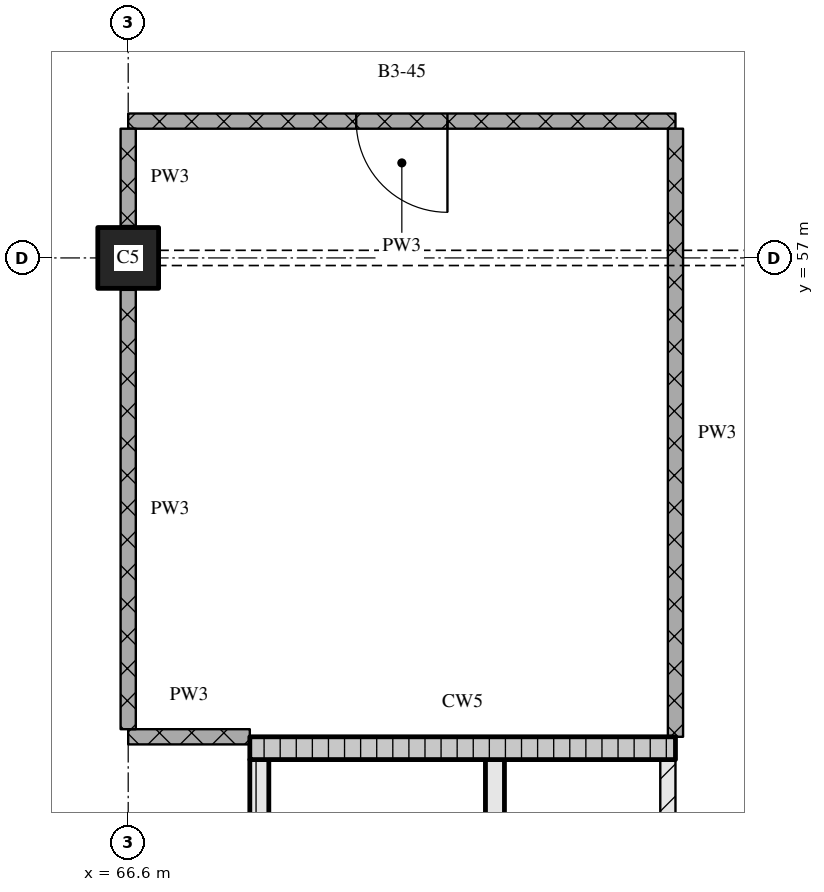
"""IFC4 building model, lengths in metres.
Left out: names, types, materials, properties, quantities, classifications, styles, units other than length and angle.
Written with IfcOpenShell. Run it as: python <this file> out.ifc"""

import sys

from ifc_helpers import new_model, si_unit, direction, frame, frame_2d, origin, origin_2d, place, context, subcontext, project, spatial, rectangle, extrude, element, fill, save


model = new_model("IFC4")
c1 = context("Model", 3, precision=1e-05, world=origin(), true_north=direction((0.0, 1.0)))
c2 = subcontext(c1, "Body", "Model", "MODEL_VIEW")
j1 = project(units=[si_unit("LENGTHUNIT", "METRE"), si_unit("PLANEANGLEUNIT", "RADIAN")], contexts=[c1])
p1 = place(None, origin())
s1 = spatial("IfcSite", under=j1, at=p1, CompositionType="ELEMENT")
p2 = place(p1, origin())
s2 = spatial("IfcBuilding", under=s1, at=p2, CompositionType="ELEMENT")
p3 = place(p2, frame((0.0, 0.0, 124.05)))
s3 = spatial("IfcBuildingStorey", under=s2, at=p3, CompositionType="ELEMENT", Elevation=124.05)
p4 = place(p3, frame((66.6, 57.0, 0.0), z_axis=(0.0, 0.0, 1.0), x_axis=(1.0, 0.0, 0.0)))
e1 = element("IfcColumn", 1, at=p4, inside=s3, PredefinedType="COLUMN", context=c2, shape_type="SweptSolid", body=[
    extrude(rectangle(XDim=0.8, YDim=0.8, at=origin_2d()), origin(), (0.0, 0.0, 1.0), 3.6),
])
p5 = place(p3, frame((68.325, 43.5, 0.0), z_axis=(0.0, 0.0, 1.0), x_axis=(0.0, 1.0, 0.0)))
e2 = element("IfcWall", 2, at=p5, inside=s3, PredefinedType="SOLIDWALL", context=c2, shape_type="SweptSolid", body=[
    extrude(rectangle(XDim=6.9, YDim=0.25, at=frame_2d((3.45, 0.0))), origin(), (0.0, 0.0, 1.0), 3.32),
])
p6 = place(p3, frame((71.425, 43.5, 0.0), z_axis=(0.0, 0.0, 1.0), x_axis=(0.0, 1.0, 0.0)))
e3 = element("IfcWall", 3, at=p6, inside=s3, PredefinedType="SOLIDWALL", context=c2, shape_type="SweptSolid", body=[
    extrude(rectangle(XDim=6.9, YDim=0.25, at=frame_2d((3.45, 0.0))), origin(), (0.0, 0.0, 1.0), 3.32),
])
p7 = place(p6, frame((0.2, 0.0, 0.0)))
e4 = element("IfcOpeningElement", 4, at=p7, cuts=e3, PredefinedType="OPENING", context=c2, shape_type="SweptSolid", body=[
    extrude(rectangle(XDim=1.0, YDim=2.1, at=frame_2d((0.5, 1.05))), frame((0.0, 0.135, 0.0), z_axis=(0.0, -1.0, 0.0), x_axis=(1.0, 0.0, 0.0)), (0.0, 0.0, 1.0), 0.27),
])
p8 = place(p3, frame((73.7, 43.5, 0.0), z_axis=(0.0, 0.0, 1.0), x_axis=(0.0, 1.0, 0.0)))
e5 = element("IfcWall", 5, at=p8, inside=s3, PredefinedType="PARTITIONING", context=c2, shape_type="SweptSolid", body=[
    extrude(rectangle(XDim=6.9, YDim=0.2, at=frame_2d((3.45, 0.0))), origin(), (0.0, 0.0, 1.0), 3.32),
])
p9 = place(p8, frame((1.0, 0.0, 0.0)))
e6 = element("IfcOpeningElement", 6, at=p9, cuts=e5, PredefinedType="OPENING", context=c2, shape_type="SweptSolid", body=[
    extrude(rectangle(XDim=1.0, YDim=2.1, at=frame_2d((0.5, 1.05))), frame((0.0, 0.11, 0.0), z_axis=(0.0, -1.0, 0.0), x_axis=(1.0, 0.0, 0.0)), (0.0, 0.0, 1.0), 0.22),
])
p10 = place(p3, frame((68.2, 50.55, 0.0), z_axis=(0.0, 0.0, 1.0), x_axis=(1.0, 0.0, 0.0)))
e7 = element("IfcWall", 7, at=p10, inside=s3, PredefinedType="SOLIDWALL", context=c2, shape_type="SweptSolid", body=[
    extrude(rectangle(XDim=5.6, YDim=0.3, at=frame_2d((2.8, 0.0))), origin(), (0.0, 0.0, 1.0), 3.32),
])
p11 = place(p3, frame((66.6, 50.7, 0.0), z_axis=(0.0, 0.0, 1.0), x_axis=(1.0, 0.0, 0.0)))
e8 = element("IfcWall", 8, at=p11, inside=s3, PredefinedType="PARTITIONING", context=c2, shape_type="SweptSolid", body=[
    extrude(rectangle(XDim=1.6, YDim=0.2, at=frame_2d((0.8, 0.0))), origin(), (0.0, 0.0, 1.0), 3.32),
])
p12 = place(p3, frame((73.8, 58.8, 0.0), z_axis=(0.0, 0.0, 1.0), x_axis=(-1.0, 0.0, 0.0)))
e9 = element("IfcWall", 9, at=p12, inside=s3, PredefinedType="PARTITIONING", context=c2, shape_type="SweptSolid", body=[
    extrude(rectangle(XDim=7.2, YDim=0.2, at=frame_2d((3.6, 0.0))), origin(), (0.0, 0.0, 1.0), 3.32),
])
p13 = place(p12, frame((3.0, 0.0, 0.0)))
e10 = element("IfcOpeningElement", 10, at=p13, cuts=e9, PredefinedType="OPENING", context=c2, shape_type="SweptSolid", body=[
    extrude(rectangle(XDim=1.2, YDim=2.1, at=frame_2d((0.6, 1.05))), frame((0.0, 0.11, 0.0), z_axis=(0.0, -1.0, 0.0), x_axis=(1.0, 0.0, 0.0)), (0.0, 0.0, 1.0), 0.22),
])
p14 = place(p3, frame((66.6, 56.58, 0.0), z_axis=(0.0, 0.0, 1.0), x_axis=(0.0, -1.0, 0.0)))
e11 = element("IfcWall", 11, at=p14, inside=s3, PredefinedType="PARTITIONING", context=c2, shape_type="SweptSolid", body=[
    extrude(rectangle(XDim=5.78, YDim=0.2, at=frame_2d((2.89, 0.0))), origin(), (0.0, 0.0, 1.0), 3.32),
])
p15 = place(p3, frame((66.6, 58.7, 0.0), z_axis=(0.0, 0.0, 1.0), x_axis=(0.0, -1.0, 0.0)))
e12 = element("IfcWall", 12, at=p15, inside=s3, PredefinedType="PARTITIONING", context=c2, shape_type="SweptSolid", body=[
    extrude(rectangle(XDim=1.28, YDim=0.2, at=frame_2d((0.64, 0.0))), origin(), (0.0, 0.0, 1.0), 3.32),
])
p16 = place(p3, frame((73.8, 58.7, 0.0), z_axis=(0.0, 0.0, 1.0), x_axis=(0.0, -1.0, 0.0)))
e13 = element("IfcWall", 13, at=p16, inside=s3, PredefinedType="PARTITIONING", context=c2, shape_type="SweptSolid", body=[
    extrude(rectangle(XDim=8.0, YDim=0.2, at=frame_2d((4.0, 0.0))), origin(), (0.0, 0.0, 1.0), 3.32),
])
p17 = place(p13, origin())
e14 = element("IfcDoor", 14, at=p17, inside=s3, OperationType="SINGLE_SWING_LEFT", PredefinedType="DOOR", context=c2, shape_type="SweptSolid", body=[
    extrude(rectangle(XDim=1.2, YDim=2.1, at=frame_2d((0.6, 1.05))), frame((0.0, 0.025, 0.0), z_axis=(0.0, -1.0, 0.0), x_axis=(1.0, 0.0, 0.0)), (0.0, 0.0, 1.0), 0.05),
])
fill(e10, e14)
save(model, sys.argv[1])
